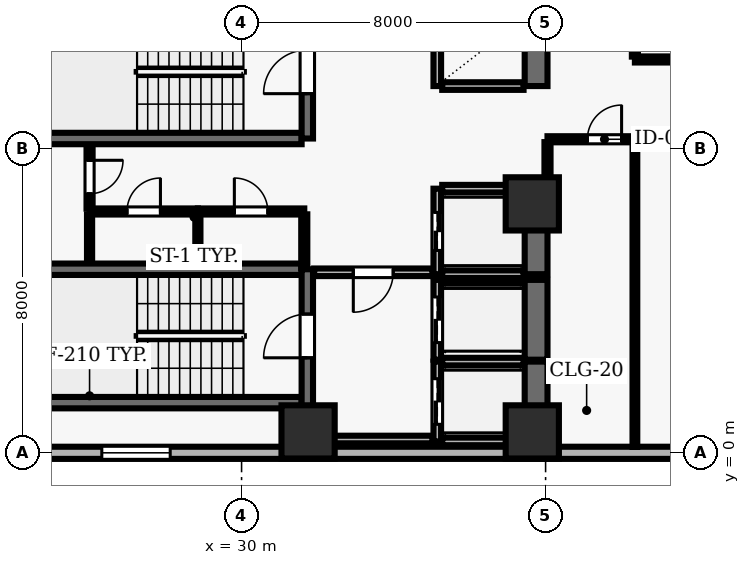
"""IFC4 building model, lengths in metres.
Left out: names, types, materials, properties, quantities, classifications, styles, units other than length and angle.
Written with IfcOpenShell. Run it as: python <this file> out.ifc"""

import sys

from ifc_helpers import new_model, si_unit, direction, frame, frame_2d, origin, origin_2d, place, context, subcontext, project, spatial, rectangle, extrude, element, fill, save


model = new_model("IFC4")
c1 = context("Model", 3, precision=1e-05, world=origin(), true_north=direction((0.0, 1.0)))
c2 = subcontext(c1, "Body", "Model", "MODEL_VIEW")
j1 = project(units=[si_unit("LENGTHUNIT", "METRE"), si_unit("PLANEANGLEUNIT", "RADIAN")], contexts=[c1])
p1 = place(None, origin())
s1 = spatial("IfcSite", under=j1, at=p1, CompositionType="ELEMENT")
p2 = place(p1, origin())
s2 = spatial("IfcBuilding", under=s1, at=p2, CompositionType="ELEMENT")
p3 = place(p2, frame((0.0, 0.0, 77.8)))
s3 = spatial("IfcBuildingStorey", under=s2, at=p3, CompositionType="ELEMENT", Elevation=77.8)
for number, where, z_axis, x_axis in (
    (1, (31.75, 0.55, 0.0), (0.0, 0.0, 1.0), (1.0, 0.0, 0.0)),
    (2, (37.65, 0.55, 0.0), (0.0, 0.0, 1.0), (1.0, 0.0, 0.0)),
    (3, (37.65, 6.55, 0.0), (0.0, 0.0, 1.0), (1.0, 0.0, 0.0)),
):
    element("IfcColumn", number, at=place(p3, frame(where, z_axis=z_axis, x_axis=x_axis)), inside=s3, PredefinedType="COLUMN", context=c2, shape_type="SweptSolid", body=[
        extrude(rectangle(XDim=1.4, YDim=1.4, at=origin_2d()), origin(), (0.0, 0.0, 1.0), 3.9),
    ])
p4 = place(p3, frame((24.5, 0.0, 0.0), z_axis=(0.0, 0.0, 1.0), x_axis=(1.0, 0.0, 0.0)))
e4 = element("IfcWall", 4, at=p4, inside=s3, PredefinedType="SOLIDWALL", context=c2, shape_type="SweptSolid", body=[
    extrude(rectangle(XDim=49.0, YDim=0.32, at=frame_2d((24.5, 0.0))), origin(), (0.0, 0.0, 1.0), 3.69),
])
p5 = place(p4, frame((1.822, 0.0, 0.9)))
e5 = element("IfcOpeningElement", 5, at=p5, cuts=e4, PredefinedType="OPENING", context=c2, shape_type="SweptSolid", body=[
    extrude(rectangle(XDim=1.8, YDim=1.8, at=frame_2d((0.9, 0.9))), frame((0.0, 0.17, 0.0), z_axis=(0.0, -1.0, 0.0), x_axis=(1.0, 0.0, 0.0)), (0.0, 0.0, 1.0), 0.34),
])
p6 = place(p4, frame((18.156, 0.0, 0.9)))
e6 = element("IfcOpeningElement", 6, at=p6, cuts=e4, PredefinedType="OPENING", context=c2, shape_type="SweptSolid", body=[
    extrude(rectangle(XDim=1.8, YDim=1.8, at=frame_2d((0.9, 0.9))), frame((0.0, 0.17, 0.0), z_axis=(0.0, -1.0, 0.0), x_axis=(1.0, 0.0, 0.0)), (0.0, 0.0, 1.0), 0.34),
])
p7 = place(p4, frame((23.6, 0.0, 0.9)))
e7 = element("IfcOpeningElement", 7, at=p7, cuts=e4, PredefinedType="OPENING", context=c2, shape_type="SweptSolid", body=[
    extrude(rectangle(XDim=1.8, YDim=1.8, at=frame_2d((0.9, 0.9))), frame((0.0, 0.17, 0.0), z_axis=(0.0, -1.0, 0.0), x_axis=(1.0, 0.0, 0.0)), (0.0, 0.0, 1.0), 0.34),
])
p8 = place(p4, frame((29.044, 0.0, 0.9)))
e8 = element("IfcOpeningElement", 8, at=p8, cuts=e4, PredefinedType="OPENING", context=c2, shape_type="SweptSolid", body=[
    extrude(rectangle(XDim=1.8, YDim=1.8, at=frame_2d((0.9, 0.9))), frame((0.0, 0.17, 0.0), z_axis=(0.0, -1.0, 0.0), x_axis=(1.0, 0.0, 0.0)), (0.0, 0.0, 1.0), 0.34),
])
p9 = place(p4, frame((34.489, 0.0, 0.9)))
e9 = element("IfcOpeningElement", 9, at=p9, cuts=e4, PredefinedType="OPENING", context=c2, shape_type="SweptSolid", body=[
    extrude(rectangle(XDim=1.8, YDim=1.8, at=frame_2d((0.9, 0.9))), frame((0.0, 0.17, 0.0), z_axis=(0.0, -1.0, 0.0), x_axis=(1.0, 0.0, 0.0)), (0.0, 0.0, 1.0), 0.34),
])
p10 = place(p4, frame((39.933, 0.0, 0.9)))
e10 = element("IfcOpeningElement", 10, at=p10, cuts=e4, PredefinedType="OPENING", context=c2, shape_type="SweptSolid", body=[
    extrude(rectangle(XDim=1.8, YDim=1.8, at=frame_2d((0.9, 0.9))), frame((0.0, 0.17, 0.0), z_axis=(0.0, -1.0, 0.0), x_axis=(1.0, 0.0, 0.0)), (0.0, 0.0, 1.0), 0.34),
])
p11 = place(p4, frame((45.378, 0.0, 0.9)))
e11 = element("IfcOpeningElement", 11, at=p11, cuts=e4, PredefinedType="OPENING", context=c2, shape_type="SweptSolid", body=[
    extrude(rectangle(XDim=1.8, YDim=1.8, at=frame_2d((0.9, 0.9))), frame((0.0, 0.17, 0.0), z_axis=(0.0, -1.0, 0.0), x_axis=(1.0, 0.0, 0.0)), (0.0, 0.0, 1.0), 0.34),
])
for number, where, z_axis, x_axis in (
    (12, (31.58, 4.83, 0.0), (0.0, 0.0, 1.0), (-1.0, 0.0, 0.0)),
    (13, (23.22, 1.32, 0.0), (0.0, 0.0, 1.0), (1.0, 0.0, 0.0)),
):
    element("IfcWall", number, at=place(p3, frame(where, z_axis=z_axis, x_axis=x_axis)), inside=s3, PredefinedType="SHEAR", context=c2, shape_type="SweptSolid", body=[
        extrude(rectangle(XDim=8.36, YDim=0.3, at=frame_2d((4.18, 0.0))), origin(), (0.0, 0.0, 1.0), 3.69),
    ])
p12 = place(p3, frame((31.73, 0.96, 0.0), z_axis=(0.0, 0.0, 1.0), x_axis=(0.0, 1.0, 0.0)))
e14 = element("IfcWall", 14, at=p12, inside=s3, PredefinedType="SHEAR", context=c2, shape_type="SweptSolid", body=[
    extrude(rectangle(XDim=3.87, YDim=0.3, at=frame_2d((1.935, 0.0))), origin(), (0.0, 0.0, 1.0), 3.69),
])
p13 = place(p12, frame((1.54, 0.0, 0.0)))
e15 = element("IfcOpeningElement", 15, at=p13, cuts=e14, PredefinedType="OPENING", context=c2, shape_type="SweptSolid", body=[
    extrude(rectangle(XDim=1.15, YDim=2.15, at=frame_2d((0.575, 1.075))), frame((0.0, 0.16, 0.0), z_axis=(0.0, -1.0, 0.0), x_axis=(1.0, 0.0, 0.0)), (0.0, 0.0, 1.0), 0.32),
])
p14 = place(p3, frame((23.22, 8.27, 0.0), z_axis=(0.0, 0.0, 1.0), x_axis=(1.0, 0.0, 0.0)))
e16 = element("IfcWall", 16, at=p14, inside=s3, PredefinedType="SHEAR", context=c2, shape_type="SweptSolid", body=[
    extrude(rectangle(XDim=8.36, YDim=0.3, at=frame_2d((4.18, 0.0))), origin(), (0.0, 0.0, 1.0), 3.69),
])
p15 = place(p3, frame((31.73, 8.27, 0.0), z_axis=(0.0, 0.0, 1.0), x_axis=(0.0, 1.0, 0.0)))
e17 = element("IfcWall", 17, at=p15, inside=s3, PredefinedType="SHEAR", context=c2, shape_type="SweptSolid", body=[
    extrude(rectangle(XDim=3.51, YDim=0.3, at=frame_2d((1.755, 0.0))), origin(), (0.0, 0.0, 1.0), 3.69),
])
p16 = place(p15, frame((1.18, 0.0, 0.0)))
e18 = element("IfcOpeningElement", 18, at=p16, cuts=e17, PredefinedType="OPENING", context=c2, shape_type="SweptSolid", body=[
    extrude(rectangle(XDim=1.15, YDim=2.15, at=frame_2d((0.575, 1.075))), frame((0.0, 0.16, 0.0), z_axis=(0.0, -1.0, 0.0), x_axis=(1.0, 0.0, 0.0)), (0.0, 0.0, 1.0), 0.32),
])
p17 = place(p3, frame((35.15, 2.4, 0.0), z_axis=(0.0, 0.0, 1.0), x_axis=(0.0, -1.0, 0.0)))
e19 = element("IfcWall", 19, at=p17, inside=s3, PredefinedType="SOLIDWALL", context=c2, shape_type="SweptSolid", body=[
    extrude(rectangle(XDim=2.1, YDim=0.2, at=frame_2d((1.05, 0.0))), origin(), (0.0, 0.0, 1.0), 3.69),
])
p18 = place(p17, frame((0.45, 0.0, 0.0)))
e20 = element("IfcOpeningElement", 20, at=p18, cuts=e19, PredefinedType="OPENING", context=c2, shape_type="SweptSolid", body=[
    extrude(rectangle(XDim=1.2, YDim=2.15, at=frame_2d((0.6, 1.075))), frame((0.0, 0.11, 0.0), z_axis=(0.0, -1.0, 0.0), x_axis=(1.0, 0.0, 0.0)), (0.0, 0.0, 1.0), 0.22),
])
p19 = place(p3, frame((37.75, 0.3, 0.0), z_axis=(0.0, 0.0, 1.0), x_axis=(0.0, 1.0, 0.0)))
e21 = element("IfcWall", 21, at=p19, inside=s3, PredefinedType="SHEAR", context=c2, shape_type="SweptSolid", body=[
    extrude(rectangle(XDim=2.1, YDim=0.6, at=frame_2d((1.05, 0.0))), origin(), (0.0, 0.0, 1.0), 3.69),
])
for number, where, z_axis, x_axis in (
    (22, (35.28, 0.3, 0.0), (0.0, 0.0, 1.0), (1.0, 0.0, 0.0)),
    (23, (37.42, 2.4, 0.0), (0.0, 0.0, 1.0), (-1.0, 0.0, 0.0)),
):
    element("IfcWall", number, at=place(p3, frame(where, z_axis=z_axis, x_axis=x_axis)), inside=s3, PredefinedType="SOLIDWALL", context=c2, shape_type="SweptSolid", body=[
        extrude(rectangle(XDim=2.14, YDim=0.2, at=frame_2d((1.07, 0.0))), origin(), (0.0, 0.0, 1.0), 3.69),
    ])
p20 = place(p3, frame((35.15, 4.55, 0.0), z_axis=(0.0, 0.0, 1.0), x_axis=(0.0, -1.0, 0.0)))
e24 = element("IfcWall", 24, at=p20, inside=s3, PredefinedType="SOLIDWALL", context=c2, shape_type="SweptSolid", body=[
    extrude(rectangle(XDim=2.1, YDim=0.2, at=frame_2d((1.05, 0.0))), origin(), (0.0, 0.0, 1.0), 3.69),
])
p21 = place(p20, frame((0.45, 0.0, 0.0)))
e25 = element("IfcOpeningElement", 25, at=p21, cuts=e24, PredefinedType="OPENING", context=c2, shape_type="SweptSolid", body=[
    extrude(rectangle(XDim=1.2, YDim=2.15, at=frame_2d((0.6, 1.075))), frame((0.0, 0.11, 0.0), z_axis=(0.0, -1.0, 0.0), x_axis=(1.0, 0.0, 0.0)), (0.0, 0.0, 1.0), 0.22),
])
p22 = place(p3, frame((37.75, 2.45, 0.0), z_axis=(0.0, 0.0, 1.0), x_axis=(0.0, 1.0, 0.0)))
e26 = element("IfcWall", 26, at=p22, inside=s3, PredefinedType="SHEAR", context=c2, shape_type="SweptSolid", body=[
    extrude(rectangle(XDim=2.1, YDim=0.6, at=frame_2d((1.05, 0.0))), origin(), (0.0, 0.0, 1.0), 3.69),
])
p23 = place(p3, frame((37.42, 4.55, 0.0), z_axis=(0.0, 0.0, 1.0), x_axis=(-1.0, 0.0, 0.0)))
e27 = element("IfcWall", 27, at=p23, inside=s3, PredefinedType="SOLIDWALL", context=c2, shape_type="SweptSolid", body=[
    extrude(rectangle(XDim=2.14, YDim=0.2, at=frame_2d((1.07, 0.0))), origin(), (0.0, 0.0, 1.0), 3.69),
])
p24 = place(p3, frame((35.15, 6.95, 0.0), z_axis=(0.0, 0.0, 1.0), x_axis=(0.0, -1.0, 0.0)))
e28 = element("IfcWall", 28, at=p24, inside=s3, PredefinedType="SOLIDWALL", context=c2, shape_type="SweptSolid", body=[
    extrude(rectangle(XDim=2.25, YDim=0.2, at=frame_2d((1.125, 0.0))), origin(), (0.0, 0.0, 1.0), 3.69),
])
p25 = place(p24, frame((0.625, 0.0, 0.0)))
e29 = element("IfcOpeningElement", 29, at=p25, cuts=e28, PredefinedType="OPENING", context=c2, shape_type="SweptSolid", body=[
    extrude(rectangle(XDim=1.0, YDim=2.1, at=frame_2d((0.5, 1.05))), frame((0.0, 0.11, 0.0), z_axis=(0.0, -1.0, 0.0), x_axis=(1.0, 0.0, 0.0)), (0.0, 0.0, 1.0), 0.22),
])
p26 = place(p3, frame((37.75, 4.7, 0.0), z_axis=(0.0, 0.0, 1.0), x_axis=(0.0, 1.0, 0.0)))
e30 = element("IfcWall", 30, at=p26, inside=s3, PredefinedType="SHEAR", context=c2, shape_type="SweptSolid", body=[
    extrude(rectangle(XDim=2.25, YDim=0.6, at=frame_2d((1.125, 0.0))), origin(), (0.0, 0.0, 1.0), 3.69),
])
for number, where, z_axis, x_axis in (
    (31, (35.28, 4.7, 0.0), (0.0, 0.0, 1.0), (1.0, 0.0, 0.0)),
    (32, (37.42, 6.95, 0.0), (0.0, 0.0, 1.0), (-1.0, 0.0, 0.0)),
):
    element("IfcWall", number, at=place(p3, frame(where, z_axis=z_axis, x_axis=x_axis)), inside=s3, PredefinedType="SOLIDWALL", context=c2, shape_type="SweptSolid", body=[
        extrude(rectangle(XDim=2.14, YDim=0.2, at=frame_2d((1.07, 0.0))), origin(), (0.0, 0.0, 1.0), 3.69),
    ])
p27 = place(p3, frame((35.15, 11.55, 0.0), z_axis=(0.0, 0.0, 1.0), x_axis=(0.0, -1.0, 0.0)))
e33 = element("IfcWall", 33, at=p27, inside=s3, PredefinedType="SOLIDWALL", context=c2, shape_type="SweptSolid", body=[
    extrude(rectangle(XDim=1.9, YDim=0.2, at=frame_2d((0.95, 0.0))), origin(), (0.0, 0.0, 1.0), 3.69),
])
p28 = place(p3, frame((37.75, 9.65, 0.0), z_axis=(0.0, 0.0, 1.0), x_axis=(0.0, 1.0, 0.0)))
e34 = element("IfcWall", 34, at=p28, inside=s3, PredefinedType="SHEAR", context=c2, shape_type="SweptSolid", body=[
    extrude(rectangle(XDim=1.9, YDim=0.6, at=frame_2d((0.95, 0.0))), origin(), (0.0, 0.0, 1.0), 3.69),
])
p29 = place(p3, frame((35.28, 9.65, 0.0), z_axis=(0.0, 0.0, 1.0), x_axis=(1.0, 0.0, 0.0)))
e35 = element("IfcWall", 35, at=p29, inside=s3, PredefinedType="SOLIDWALL", context=c2, shape_type="SweptSolid", body=[
    extrude(rectangle(XDim=2.14, YDim=0.2, at=frame_2d((1.07, 0.0))), origin(), (0.0, 0.0, 1.0), 3.69),
])
p30 = place(p3, frame((26.0, 6.35, 0.0), z_axis=(0.0, 0.0, 1.0), x_axis=(1.0, 0.0, 0.0)))
e36 = element("IfcWall", 36, at=p30, inside=s3, PredefinedType="PARTITIONING", context=c2, shape_type="SweptSolid", body=[
    extrude(rectangle(XDim=2.85, YDim=0.16, at=frame_2d((1.425, 0.0))), origin(), (0.0, 0.0, 1.0), 3.69),
])
p31 = place(p30, frame((0.985, 0.0, 0.0)))
e37 = element("IfcOpeningElement", 37, at=p31, cuts=e36, PredefinedType="OPENING", context=c2, shape_type="SweptSolid", body=[
    extrude(rectangle(XDim=0.88, YDim=2.1, at=frame_2d((0.44, 1.05))), frame((0.0, 0.09, 0.0), z_axis=(0.0, -1.0, 0.0), x_axis=(1.0, 0.0, 0.0)), (0.0, 0.0, 1.0), 0.18),
])
p32 = place(p3, frame((28.85, 6.35, 0.0), z_axis=(0.0, 0.0, 1.0), x_axis=(1.0, 0.0, 0.0)))
e38 = element("IfcWall", 38, at=p32, inside=s3, PredefinedType="PARTITIONING", context=c2, shape_type="SweptSolid", body=[
    extrude(rectangle(XDim=2.8, YDim=0.16, at=frame_2d((1.4, 0.0))), origin(), (0.0, 0.0, 1.0), 3.69),
])
p33 = place(p32, frame((0.96, 0.0, 0.0)))
e39 = element("IfcOpeningElement", 39, at=p33, cuts=e38, PredefinedType="OPENING", context=c2, shape_type="SweptSolid", body=[
    extrude(rectangle(XDim=0.88, YDim=2.1, at=frame_2d((0.44, 1.05))), frame((0.0, 0.09, 0.0), z_axis=(0.0, -1.0, 0.0), x_axis=(1.0, 0.0, 0.0)), (0.0, 0.0, 1.0), 0.18),
])
p34 = place(p3, frame((31.65, 0.35, 0.0), z_axis=(0.0, 0.0, 1.0), x_axis=(1.0, 0.0, 0.0)))
e40 = element("IfcWall", 40, at=p34, inside=s3, PredefinedType="SOLIDWALL", context=c2, shape_type="SweptSolid", body=[
    extrude(rectangle(XDim=3.37, YDim=0.2, at=frame_2d((1.685, 0.0))), origin(), (0.0, 0.0, 1.0), 3.69),
])
p35 = place(p3, frame((35.02, 4.75, 0.0), z_axis=(0.0, 0.0, 1.0), x_axis=(-1.0, 0.0, 0.0)))
e41 = element("IfcWall", 41, at=p35, inside=s3, PredefinedType="SOLIDWALL", context=c2, shape_type="SweptSolid", body=[
    extrude(rectangle(XDim=3.11, YDim=0.2, at=frame_2d((1.555, 0.0))), origin(), (0.0, 0.0, 1.0), 3.69),
])
p36 = place(p35, frame((1.03, 0.0, 0.0)))
e42 = element("IfcOpeningElement", 42, at=p36, cuts=e41, PredefinedType="OPENING", context=c2, shape_type="SweptSolid", body=[
    extrude(rectangle(XDim=1.05, YDim=2.15, at=frame_2d((0.525, 1.075))), frame((0.0, 0.11, 0.0), z_axis=(0.0, -1.0, 0.0), x_axis=(1.0, 0.0, 0.0)), (0.0, 0.0, 1.0), 0.22),
])
p37 = place(p3, frame((38.05, 8.25, 0.0), z_axis=(0.0, 0.0, 1.0), x_axis=(1.0, 0.0, 0.0)))
e43 = element("IfcWall", 43, at=p37, inside=s3, PredefinedType="PARTITIONING", context=c2, shape_type="SweptSolid", body=[
    extrude(rectangle(XDim=2.3, YDim=0.16, at=frame_2d((1.15, 0.0))), origin(), (0.0, 0.0, 1.0), 2.995),
])
p38 = place(p37, frame((1.05, 0.0, 0.0)))
e44 = element("IfcOpeningElement", 44, at=p38, cuts=e43, PredefinedType="OPENING", context=c2, shape_type="SweptSolid", body=[
    extrude(rectangle(XDim=0.9, YDim=2.1, at=frame_2d((0.45, 1.05))), frame((0.0, 0.09, 0.0), z_axis=(0.0, -1.0, 0.0), x_axis=(1.0, 0.0, 0.0)), (0.0, 0.0, 1.0), 0.18),
])
p39 = place(p3, frame((40.35, 8.25, 0.0), z_axis=(0.0, 0.0, 1.0), x_axis=(1.0, 0.0, 0.0)))
e45 = element("IfcWall", 45, at=p39, inside=s3, PredefinedType="PARTITIONING", context=c2, shape_type="SweptSolid", body=[
    extrude(rectangle(XDim=10.7, YDim=0.16, at=frame_2d((5.35, 0.0))), origin(), (0.0, 0.0, 1.0), 2.995),
])
p40 = place(p39, frame((3.15, 0.0, 0.0)))
e46 = element("IfcOpeningElement", 46, at=p40, cuts=e45, PredefinedType="OPENING", context=c2, shape_type="SweptSolid", body=[
    extrude(rectangle(XDim=0.9, YDim=2.1, at=frame_2d((0.45, 1.05))), frame((0.0, 0.09, 0.0), z_axis=(0.0, -1.0, 0.0), x_axis=(1.0, 0.0, 0.0)), (0.0, 0.0, 1.0), 0.18),
])
p41 = place(p3, frame((51.05, 10.35, 0.0), z_axis=(0.0, 0.0, 1.0), x_axis=(-1.0, 0.0, 0.0)))
e47 = element("IfcWall", 47, at=p41, inside=s3, PredefinedType="PARTITIONING", context=c2, shape_type="SweptSolid", body=[
    extrude(rectangle(XDim=10.7, YDim=0.16, at=frame_2d((5.35, 0.0))), origin(), (0.0, 0.0, 1.0), 3.227),
])
p42 = place(p41, frame((4.9, 0.0, 0.0)))
e48 = element("IfcOpeningElement", 48, at=p42, cuts=e47, PredefinedType="OPENING", context=c2, shape_type="SweptSolid", body=[
    extrude(rectangle(XDim=0.9, YDim=2.1, at=frame_2d((0.45, 1.05))), frame((0.0, 0.09, 0.0), z_axis=(0.0, -1.0, 0.0), x_axis=(1.0, 0.0, 0.0)), (0.0, 0.0, 1.0), 0.18),
])
p43 = place(p3, frame((26.0, 5.01, 0.0), z_axis=(0.0, 0.0, 1.0), x_axis=(0.0, 1.0, 0.0)))
e49 = element("IfcWall", 49, at=p43, inside=s3, PredefinedType="PARTITIONING", context=c2, shape_type="SweptSolid", body=[
    extrude(rectangle(XDim=1.265, YDim=0.135, at=frame_2d((0.632, 0.0))), origin(), (0.0, 0.0, 1.0), 3.69),
])
p44 = place(p3, frame((26.0, 8.09, 0.0), z_axis=(0.0, 0.0, 1.0), x_axis=(0.0, -1.0, 0.0)))
e50 = element("IfcWall", 50, at=p44, inside=s3, PredefinedType="PARTITIONING", context=c2, shape_type="SweptSolid", body=[
    extrude(rectangle(XDim=1.665, YDim=0.16, at=frame_2d((0.833, 0.0))), origin(), (0.0, 0.0, 1.0), 3.69),
])
p45 = place(p44, frame((0.393, 0.0, 0.0)))
e51 = element("IfcOpeningElement", 51, at=p45, cuts=e50, PredefinedType="OPENING", context=c2, shape_type="SweptSolid", body=[
    extrude(rectangle(XDim=0.88, YDim=2.1, at=frame_2d((0.44, 1.05))), frame((0.0, 0.09, 0.0), z_axis=(0.0, -1.0, 0.0), x_axis=(1.0, 0.0, 0.0)), (0.0, 0.0, 1.0), 0.18),
])
p46 = place(p3, frame((28.85, 5.01, 0.0), z_axis=(0.0, 0.0, 1.0), x_axis=(0.0, 1.0, 0.0)))
e52 = element("IfcWall", 52, at=p46, inside=s3, PredefinedType="PARTITIONING", context=c2, shape_type="SweptSolid", body=[
    extrude(rectangle(XDim=1.265, YDim=0.135, at=frame_2d((0.632, 0.0))), origin(), (0.0, 0.0, 1.0), 3.69),
])
p47 = place(p3, frame((31.65, 4.86, 0.0), z_axis=(0.0, 0.0, 1.0), x_axis=(0.0, 1.0, 0.0)))
e53 = element("IfcWall", 53, at=p47, inside=s3, PredefinedType="PARTITIONING", context=c2, shape_type="SweptSolid", body=[
    extrude(rectangle(XDim=1.415, YDim=0.16, at=frame_2d((0.708, 0.0))), origin(), (0.0, 0.0, 1.0), 3.69),
])
p48 = place(p3, frame((38.05, 7.05, 0.0), z_axis=(0.0, 0.0, 1.0), x_axis=(0.0, 1.0, 0.0)))
e54 = element("IfcWall", 54, at=p48, inside=s3, PredefinedType="PARTITIONING", context=c2, shape_type="SweptSolid", body=[
    extrude(rectangle(XDim=1.125, YDim=0.16, at=frame_2d((0.562, 0.0))), origin(), (0.0, 0.0, 1.0), 2.995),
])
p49 = place(p3, frame((40.35, 0.155, 0.0), z_axis=(0.0, 0.0, 1.0), x_axis=(0.0, 1.0, 0.0)))
e55 = element("IfcWall", 55, at=p49, inside=s3, PredefinedType="PARTITIONING", context=c2, shape_type="SweptSolid", body=[
    extrude(rectangle(XDim=8.02, YDim=0.125, at=frame_2d((4.01, 0.0))), origin(), (0.0, 0.0, 1.0), 3.69),
])
p50 = place(p3, frame((40.35, 10.425, 0.0), z_axis=(0.0, 0.0, 1.0), x_axis=(0.0, 1.0, 0.0)))
e56 = element("IfcWall", 56, at=p50, inside=s3, PredefinedType="PARTITIONING", context=c2, shape_type="SweptSolid", body=[
    extrude(rectangle(XDim=5.5, YDim=0.16, at=frame_2d((2.75, 0.0))), origin(), (0.0, 0.0, 1.0), 3.227),
])
p51 = place(p5, origin())
e57 = element("IfcWindow", 57, at=p51, inside=s3, PartitioningType="SINGLE_PANEL", PredefinedType="WINDOW", context=c2, shape_type="SweptSolid", body=[
    extrude(rectangle(XDim=1.8, YDim=1.8, at=frame_2d((0.9, 0.9))), frame((0.0, 0.03, 0.0), z_axis=(0.0, -1.0, 0.0), x_axis=(1.0, 0.0, 0.0)), (0.0, 0.0, 1.0), 0.06),
])
fill(e5, e57)
p52 = place(p13, origin())
e58 = element("IfcDoor", 58, at=p52, inside=s3, OperationType="SINGLE_SWING_LEFT", PredefinedType="DOOR", context=c2, shape_type="SweptSolid", body=[
    extrude(rectangle(XDim=1.15, YDim=2.15, at=frame_2d((0.575, 1.075))), frame((0.0, 0.025, 0.0), z_axis=(0.0, -1.0, 0.0), x_axis=(1.0, 0.0, 0.0)), (0.0, 0.0, 1.0), 0.05),
])
fill(e15, e58)
p53 = place(p16, origin())
e59 = element("IfcDoor", 59, at=p53, inside=s3, OperationType="SINGLE_SWING_LEFT", PredefinedType="DOOR", context=c2, shape_type="SweptSolid", body=[
    extrude(rectangle(XDim=1.15, YDim=2.15, at=frame_2d((0.575, 1.075))), frame((0.0, 0.025, 0.0), z_axis=(0.0, -1.0, 0.0), x_axis=(1.0, 0.0, 0.0)), (0.0, 0.0, 1.0), 0.05),
])
fill(e18, e59)
p54 = place(p18, origin())
e60 = element("IfcDoor", 60, at=p54, inside=s3, OperationType="DOUBLE_DOOR_SLIDING", PredefinedType="DOOR", context=c2, shape_type="SweptSolid", body=[
    extrude(rectangle(XDim=1.2, YDim=2.15, at=frame_2d((0.6, 1.075))), frame((0.0, 0.025, 0.0), z_axis=(0.0, -1.0, 0.0), x_axis=(1.0, 0.0, 0.0)), (0.0, 0.0, 1.0), 0.05),
])
fill(e20, e60)
p55 = place(p21, origin())
e61 = element("IfcDoor", 61, at=p55, inside=s3, OperationType="DOUBLE_DOOR_SLIDING", PredefinedType="DOOR", context=c2, shape_type="SweptSolid", body=[
    extrude(rectangle(XDim=1.2, YDim=2.15, at=frame_2d((0.6, 1.075))), frame((0.0, 0.025, 0.0), z_axis=(0.0, -1.0, 0.0), x_axis=(1.0, 0.0, 0.0)), (0.0, 0.0, 1.0), 0.05),
])
fill(e25, e61)
p56 = place(p25, origin())
e62 = element("IfcDoor", 62, at=p56, inside=s3, OperationType="DOUBLE_DOOR_SLIDING", PredefinedType="DOOR", context=c2, shape_type="SweptSolid", body=[
    extrude(rectangle(XDim=1.0, YDim=2.1, at=frame_2d((0.5, 1.05))), frame((0.0, 0.025, 0.0), z_axis=(0.0, -1.0, 0.0), x_axis=(1.0, 0.0, 0.0)), (0.0, 0.0, 1.0), 0.05),
])
fill(e29, e62)
p57 = place(p36, origin())
e63 = element("IfcDoor", 63, at=p57, inside=s3, OperationType="SINGLE_SWING_RIGHT", PredefinedType="DOOR", context=c2, shape_type="SweptSolid", body=[
    extrude(rectangle(XDim=1.05, YDim=2.15, at=frame_2d((0.525, 1.075))), frame((0.0, 0.025, 0.0), z_axis=(0.0, -1.0, 0.0), x_axis=(1.0, 0.0, 0.0)), (0.0, 0.0, 1.0), 0.05),
])
fill(e42, e63)
p58 = place(p45, origin())
e64 = element("IfcDoor", 64, at=p58, inside=s3, OperationType="SINGLE_SWING_LEFT", PredefinedType="DOOR", context=c2, shape_type="SweptSolid", body=[
    extrude(rectangle(XDim=0.88, YDim=2.1, at=frame_2d((0.44, 1.05))), frame((0.0, 0.025, 0.0), z_axis=(0.0, -1.0, 0.0), x_axis=(1.0, 0.0, 0.0)), (0.0, 0.0, 1.0), 0.05),
])
fill(e51, e64)
p59 = place(p31, origin())
e65 = element("IfcDoor", 65, at=p59, inside=s3, OperationType="SINGLE_SWING_RIGHT", PredefinedType="DOOR", context=c2, shape_type="SweptSolid", body=[
    extrude(rectangle(XDim=0.88, YDim=2.1, at=frame_2d((0.44, 1.05))), frame((0.0, 0.025, 0.0), z_axis=(0.0, -1.0, 0.0), x_axis=(1.0, 0.0, 0.0)), (0.0, 0.0, 1.0), 0.05),
])
fill(e37, e65)
p60 = place(p33, origin())
e66 = element("IfcDoor", 66, at=p60, inside=s3, OperationType="SINGLE_SWING_LEFT", PredefinedType="DOOR", context=c2, shape_type="SweptSolid", body=[
    extrude(rectangle(XDim=0.88, YDim=2.1, at=frame_2d((0.44, 1.05))), frame((0.0, 0.025, 0.0), z_axis=(0.0, -1.0, 0.0), x_axis=(1.0, 0.0, 0.0)), (0.0, 0.0, 1.0), 0.05),
])
fill(e39, e66)
p61 = place(p38, origin())
e67 = element("IfcDoor", 67, at=p61, inside=s3, OperationType="SINGLE_SWING_RIGHT", PredefinedType="DOOR", context=c2, shape_type="SweptSolid", body=[
    extrude(rectangle(XDim=0.9, YDim=2.1, at=frame_2d((0.45, 1.05))), frame((0.0, 0.025, 0.0), z_axis=(0.0, -1.0, 0.0), x_axis=(1.0, 0.0, 0.0)), (0.0, 0.0, 1.0), 0.05),
])
fill(e44, e67)
save(model, sys.argv[1])
